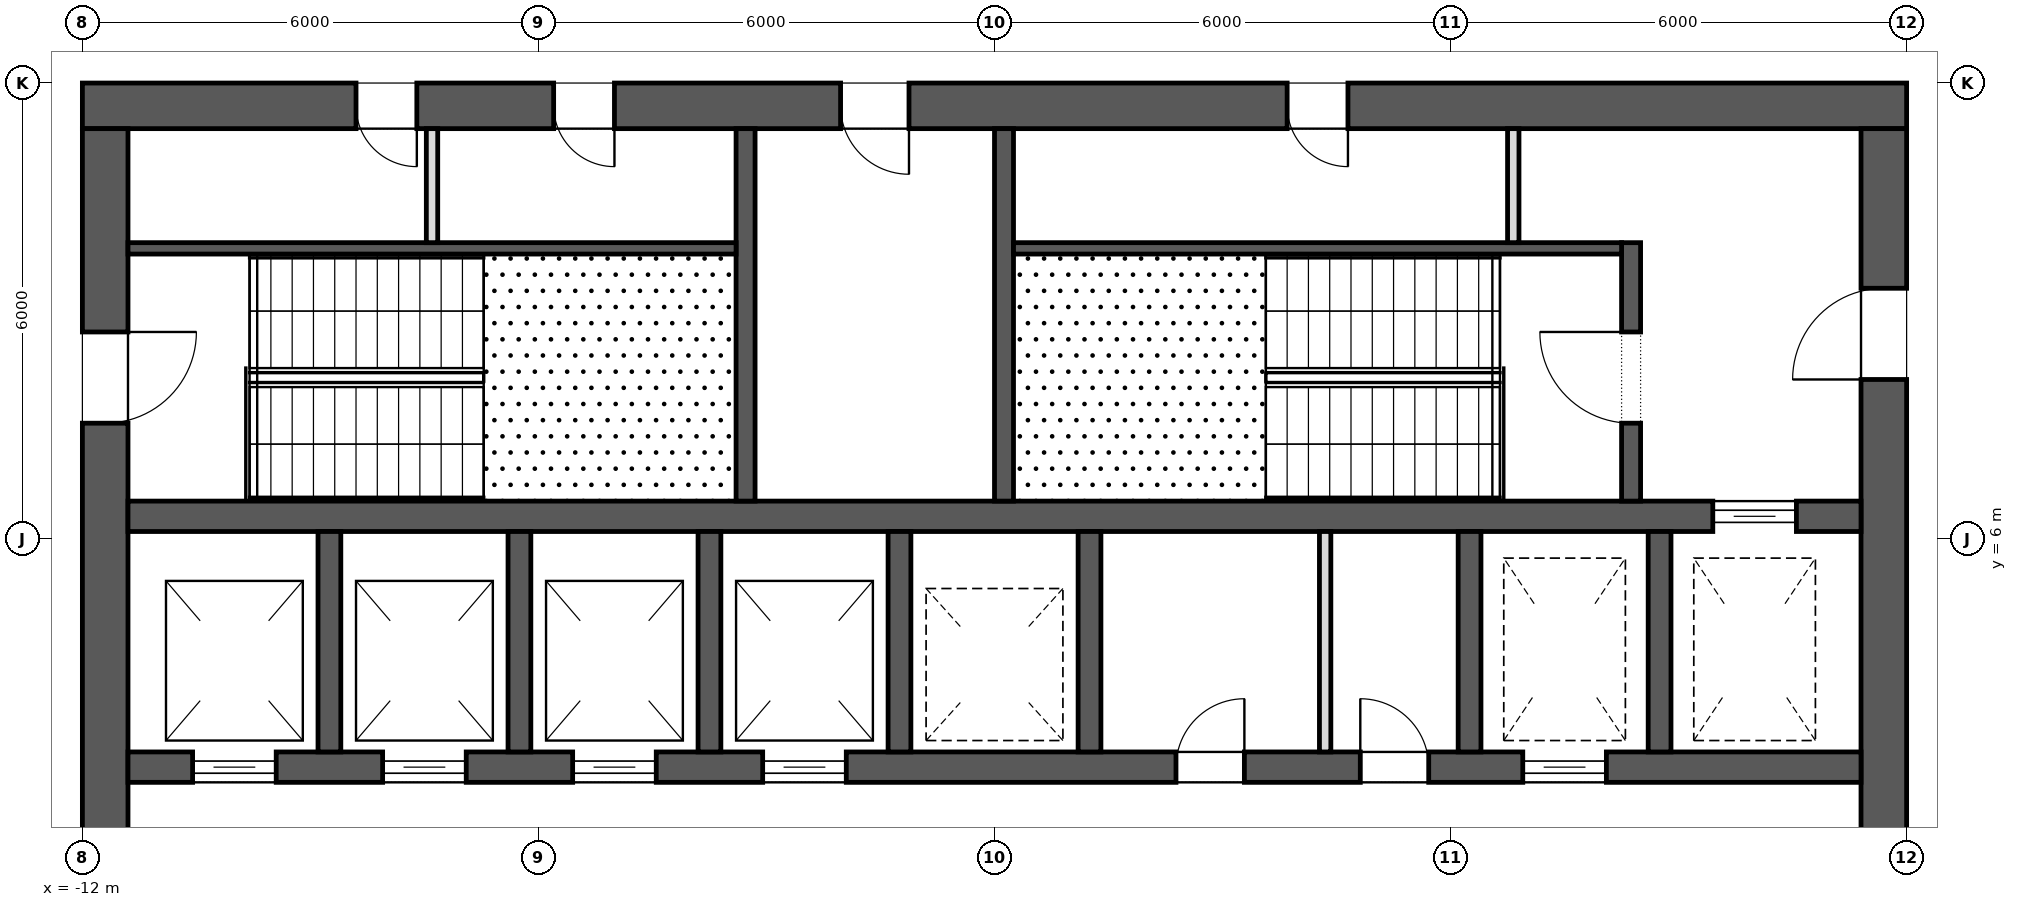
"""IFC4 building model, lengths in metres.
Left out: names, types, materials, properties, quantities, classifications, styles, units other than length and angle.
Written with IfcOpenShell. Run it as: python <this file> out.ifc"""

import sys

from ifc_helpers import new_model, si_unit, direction, frame, frame_2d, origin, place, context, subcontext, project, spatial, rectangle, extrude, element, fill, save


model = new_model("IFC4")
c1 = context("Model", 3, precision=1e-05, world=origin(), true_north=direction((0.0, 1.0)))
c2 = subcontext(c1, "Body", "Model", "MODEL_VIEW")
j1 = project(units=[si_unit("LENGTHUNIT", "METRE"), si_unit("PLANEANGLEUNIT", "RADIAN")], contexts=[c1])
p1 = place(None, origin())
s1 = spatial("IfcSite", under=j1, at=p1, CompositionType="ELEMENT")
p2 = place(p1, origin())
s2 = spatial("IfcBuilding", under=s1, at=p2, CompositionType="ELEMENT")
p3 = place(p2, frame((0.0, 0.0, 222.9)))
s3 = spatial("IfcBuildingStorey", under=s2, at=p3, CompositionType="ELEMENT", Elevation=222.9)
p4 = place(p3, frame((-12.0, 11.7, 0.0), z_axis=(0.0, 0.0, 1.0), x_axis=(1.0, 0.0, 0.0)))
e1 = element("IfcWall", 1, at=p4, inside=s3, PredefinedType="SHEAR", context=c2, shape_type="SweptSolid", body=[
    extrude(rectangle(XDim=24.0, YDim=0.6, at=frame_2d((12.0, 0.0))), origin(), (0.0, 0.0, 1.0), 4.0),
])
p5 = place(p4, frame((9.975, 0.0, 0.0)))
e2 = element("IfcOpeningElement", 2, at=p5, cuts=e1, PredefinedType="OPENING", context=c2, shape_type="SweptSolid", body=[
    extrude(rectangle(XDim=0.9, YDim=2.1, at=frame_2d((0.45, 1.05))), frame((0.0, 0.312, 0.0), z_axis=(0.0, -1.0, 0.0), x_axis=(1.0, 0.0, 0.0)), (0.0, 0.0, 1.0), 0.624),
])
p6 = place(p4, frame((3.6, 0.0, 0.0)))
e3 = element("IfcOpeningElement", 3, at=p6, cuts=e1, PredefinedType="OPENING", context=c2, shape_type="SweptSolid", body=[
    extrude(rectangle(XDim=0.8, YDim=2.1, at=frame_2d((0.4, 1.05))), frame((0.0, 0.312, 0.0), z_axis=(0.0, -1.0, 0.0), x_axis=(1.0, 0.0, 0.0)), (0.0, 0.0, 1.0), 0.624),
])
p7 = place(p4, frame((6.2, 0.0, 0.0)))
e4 = element("IfcOpeningElement", 4, at=p7, cuts=e1, PredefinedType="OPENING", context=c2, shape_type="SweptSolid", body=[
    extrude(rectangle(XDim=0.8, YDim=2.1, at=frame_2d((0.4, 1.05))), frame((0.0, 0.312, 0.0), z_axis=(0.0, -1.0, 0.0), x_axis=(1.0, 0.0, 0.0)), (0.0, 0.0, 1.0), 0.624),
])
p8 = place(p4, frame((15.85, 0.0, 0.0)))
e5 = element("IfcOpeningElement", 5, at=p8, cuts=e1, PredefinedType="OPENING", context=c2, shape_type="SweptSolid", body=[
    extrude(rectangle(XDim=0.8, YDim=2.1, at=frame_2d((0.4, 1.05))), frame((0.0, 0.312, 0.0), z_axis=(0.0, -1.0, 0.0), x_axis=(1.0, 0.0, 0.0)), (0.0, 0.0, 1.0), 0.624),
])
p9 = place(p3, frame((11.7, -11.4, 0.0), z_axis=(0.0, 0.0, 1.0), x_axis=(0.0, 1.0, 0.0)))
e6 = element("IfcWall", 6, at=p9, inside=s3, PredefinedType="SHEAR", context=c2, shape_type="SweptSolid", body=[
    extrude(rectangle(XDim=22.8, YDim=0.6, at=frame_2d((11.4, 0.0))), origin(), (0.0, 0.0, 1.0), 4.0),
])
p10 = place(p9, frame((10.2, 0.0, 0.0)))
e7 = element("IfcOpeningElement", 7, at=p10, cuts=e6, PredefinedType="OPENING", context=c2, shape_type="SweptSolid", body=[
    extrude(rectangle(XDim=2.4, YDim=2.1, at=frame_2d((1.2, 1.05))), frame((0.0, 0.312, 0.0), z_axis=(0.0, -1.0, 0.0), x_axis=(1.0, 0.0, 0.0)), (0.0, 0.0, 1.0), 0.624),
])
p11 = place(p9, frame((19.5, 0.0, 0.0)))
e8 = element("IfcOpeningElement", 8, at=p11, cuts=e6, PredefinedType="OPENING", context=c2, shape_type="SweptSolid", body=[
    extrude(rectangle(XDim=1.2, YDim=2.1, at=frame_2d((0.6, 1.05))), frame((0.0, 0.312, 0.0), z_axis=(0.0, -1.0, 0.0), x_axis=(1.0, 0.0, 0.0)), (0.0, 0.0, 1.0), 0.624),
])
p12 = place(p9, frame((2.1, 0.0, 0.0)))
e9 = element("IfcOpeningElement", 9, at=p12, cuts=e6, PredefinedType="OPENING", context=c2, shape_type="SweptSolid", body=[
    extrude(rectangle(XDim=1.2, YDim=2.1, at=frame_2d((0.6, 1.05))), frame((0.0, 0.312, 0.0), z_axis=(0.0, -1.0, 0.0), x_axis=(1.0, 0.0, 0.0)), (0.0, 0.0, 1.0), 0.624),
])
p13 = place(p3, frame((-11.7, -11.4, 0.0), z_axis=(0.0, 0.0, 1.0), x_axis=(0.0, 1.0, 0.0)))
e10 = element("IfcWall", 10, at=p13, inside=s3, PredefinedType="SHEAR", context=c2, shape_type="SweptSolid", body=[
    extrude(rectangle(XDim=22.8, YDim=0.6, at=frame_2d((11.4, 0.0))), origin(), (0.0, 0.0, 1.0), 4.0),
])
p14 = place(p13, frame((10.2, 0.0, 0.0)))
e11 = element("IfcOpeningElement", 11, at=p14, cuts=e10, PredefinedType="OPENING", context=c2, shape_type="SweptSolid", body=[
    extrude(rectangle(XDim=2.4, YDim=2.1, at=frame_2d((1.2, 1.05))), frame((0.0, 0.312, 0.0), z_axis=(0.0, -1.0, 0.0), x_axis=(1.0, 0.0, 0.0)), (0.0, 0.0, 1.0), 0.624),
])
p15 = place(p13, frame((18.925, 0.0, 0.0)))
e12 = element("IfcOpeningElement", 12, at=p15, cuts=e10, PredefinedType="OPENING", context=c2, shape_type="SweptSolid", body=[
    extrude(rectangle(XDim=1.2, YDim=2.1, at=frame_2d((0.6, 1.05))), frame((0.0, 0.312, 0.0), z_axis=(0.0, -1.0, 0.0), x_axis=(1.0, 0.0, 0.0)), (0.0, 0.0, 1.0), 0.624),
])
p16 = place(p13, frame((2.675, 0.0, 0.0)))
e13 = element("IfcOpeningElement", 13, at=p16, cuts=e10, PredefinedType="OPENING", context=c2, shape_type="SweptSolid", body=[
    extrude(rectangle(XDim=1.2, YDim=2.1, at=frame_2d((0.6, 1.05))), frame((0.0, 0.312, 0.0), z_axis=(0.0, -1.0, 0.0), x_axis=(1.0, 0.0, 0.0)), (0.0, 0.0, 1.0), 0.624),
])
p17 = place(p3, frame((-11.4, 3.0, 0.0), z_axis=(0.0, 0.0, 1.0), x_axis=(1.0, 0.0, 0.0)))
e14 = element("IfcWall", 14, at=p17, inside=s3, PredefinedType="SHEAR", context=c2, shape_type="SweptSolid", body=[
    extrude(rectangle(XDim=22.8, YDim=0.4, at=frame_2d((11.4, 0.0))), origin(), (0.0, 0.0, 1.0), 4.0),
])
p18 = place(p17, frame((0.85, 0.0, 0.0)))
e15 = element("IfcOpeningElement", 15, at=p18, cuts=e14, PredefinedType="OPENING", context=c2, shape_type="SweptSolid", body=[
    extrude(rectangle(XDim=1.1, YDim=2.1, at=frame_2d((0.55, 1.05))), frame((0.0, 0.212, 0.0), z_axis=(0.0, -1.0, 0.0), x_axis=(1.0, 0.0, 0.0)), (0.0, 0.0, 1.0), 0.424),
])
p19 = place(p17, frame((3.35, 0.0, 0.0)))
e16 = element("IfcOpeningElement", 16, at=p19, cuts=e14, PredefinedType="OPENING", context=c2, shape_type="SweptSolid", body=[
    extrude(rectangle(XDim=1.1, YDim=2.1, at=frame_2d((0.55, 1.05))), frame((0.0, 0.212, 0.0), z_axis=(0.0, -1.0, 0.0), x_axis=(1.0, 0.0, 0.0)), (0.0, 0.0, 1.0), 0.424),
])
p20 = place(p17, frame((5.85, 0.0, 0.0)))
e17 = element("IfcOpeningElement", 17, at=p20, cuts=e14, PredefinedType="OPENING", context=c2, shape_type="SweptSolid", body=[
    extrude(rectangle(XDim=1.1, YDim=2.1, at=frame_2d((0.55, 1.05))), frame((0.0, 0.212, 0.0), z_axis=(0.0, -1.0, 0.0), x_axis=(1.0, 0.0, 0.0)), (0.0, 0.0, 1.0), 0.424),
])
p21 = place(p17, frame((8.35, 0.0, 0.0)))
e18 = element("IfcOpeningElement", 18, at=p21, cuts=e14, PredefinedType="OPENING", context=c2, shape_type="SweptSolid", body=[
    extrude(rectangle(XDim=1.1, YDim=2.1, at=frame_2d((0.55, 1.05))), frame((0.0, 0.212, 0.0), z_axis=(0.0, -1.0, 0.0), x_axis=(1.0, 0.0, 0.0)), (0.0, 0.0, 1.0), 0.424),
])
p22 = place(p17, frame((18.35, 0.0, 0.0)))
e19 = element("IfcOpeningElement", 19, at=p22, cuts=e14, PredefinedType="OPENING", context=c2, shape_type="SweptSolid", body=[
    extrude(rectangle(XDim=1.1, YDim=2.1, at=frame_2d((0.55, 1.05))), frame((0.0, 0.212, 0.0), z_axis=(0.0, -1.0, 0.0), x_axis=(1.0, 0.0, 0.0)), (0.0, 0.0, 1.0), 0.424),
])
p23 = place(p17, frame((13.788, 0.0, 0.0)))
e20 = element("IfcOpeningElement", 20, at=p23, cuts=e14, PredefinedType="OPENING", context=c2, shape_type="SweptSolid", body=[
    extrude(rectangle(XDim=0.9, YDim=2.1, at=frame_2d((0.45, 1.05))), frame((0.0, 0.212, 0.0), z_axis=(0.0, -1.0, 0.0), x_axis=(1.0, 0.0, 0.0)), (0.0, 0.0, 1.0), 0.424),
])
p24 = place(p17, frame((16.212, 0.0, 0.0)))
e21 = element("IfcOpeningElement", 21, at=p24, cuts=e14, PredefinedType="OPENING", context=c2, shape_type="SweptSolid", body=[
    extrude(rectangle(XDim=0.9, YDim=2.1, at=frame_2d((0.45, 1.05))), frame((0.0, 0.212, 0.0), z_axis=(0.0, -1.0, 0.0), x_axis=(1.0, 0.0, 0.0)), (0.0, 0.0, 1.0), 0.424),
])
p25 = place(p3, frame((-11.4, 6.3, 0.0), z_axis=(0.0, 0.0, 1.0), x_axis=(1.0, 0.0, 0.0)))
e22 = element("IfcWall", 22, at=p25, inside=s3, PredefinedType="SHEAR", context=c2, shape_type="SweptSolid", body=[
    extrude(rectangle(XDim=22.8, YDim=0.4, at=frame_2d((11.4, 0.0))), origin(), (0.0, 0.0, 1.0), 4.0),
])
p26 = place(p25, frame((20.85, 0.0, 0.0)))
e23 = element("IfcOpeningElement", 23, at=p26, cuts=e22, PredefinedType="OPENING", context=c2, shape_type="SweptSolid", body=[
    extrude(rectangle(XDim=1.1, YDim=2.1, at=frame_2d((0.55, 1.05))), frame((0.0, 0.212, 0.0), z_axis=(0.0, -1.0, 0.0), x_axis=(1.0, 0.0, 0.0)), (0.0, 0.0, 1.0), 0.424),
])
for number, where, z_axis, x_axis in (
    (24, (-8.75, 3.2, 0.0), (0.0, 0.0, 1.0), (0.0, 1.0, 0.0)),
    (25, (-6.25, 3.2, 0.0), (0.0, 0.0, 1.0), (0.0, 1.0, 0.0)),
    (26, (-3.75, 3.2, 0.0), (0.0, 0.0, 1.0), (0.0, 1.0, 0.0)),
    (27, (-1.25, 3.2, 0.0), (0.0, 0.0, 1.0), (0.0, 1.0, 0.0)),
    (28, (1.25, 3.2, 0.0), (0.0, 0.0, 1.0), (0.0, 1.0, 0.0)),
    (29, (6.25, 3.2, 0.0), (0.0, 0.0, 1.0), (0.0, 1.0, 0.0)),
    (30, (8.75, 3.2, 0.0), (0.0, 0.0, 1.0), (0.0, 1.0, 0.0)),
):
    element("IfcWall", number, at=place(p3, frame(where, z_axis=z_axis, x_axis=x_axis)), inside=s3, PredefinedType="SHEAR", context=c2, shape_type="SweptSolid", body=[
        extrude(rectangle(XDim=2.9, YDim=0.3, at=frame_2d((1.45, 0.0))), origin(), (0.0, 0.0, 1.0), 4.0),
    ])
for number, where, z_axis, x_axis in (
    (31, (-3.275, 6.5, 0.0), (0.0, 0.0, 1.0), (0.0, 1.0, 0.0)),
    (32, (0.125, 6.5, 0.0), (0.0, 0.0, 1.0), (0.0, 1.0, 0.0)),
):
    element("IfcWall", number, at=place(p3, frame(where, z_axis=z_axis, x_axis=x_axis)), inside=s3, PredefinedType="SHEAR", context=c2, shape_type="SweptSolid", body=[
        extrude(rectangle(XDim=4.9, YDim=0.25, at=frame_2d((2.45, 0.0))), origin(), (0.0, 0.0, 1.0), 3.7),
    ])
p27 = place(p3, frame((8.375, 6.5, 0.0), z_axis=(0.0, 0.0, 1.0), x_axis=(0.0, 1.0, 0.0)))
e33 = element("IfcWall", 33, at=p27, inside=s3, PredefinedType="SHEAR", context=c2, shape_type="SweptSolid", body=[
    extrude(rectangle(XDim=3.4, YDim=0.25, at=frame_2d((1.7, 0.0))), origin(), (0.0, 0.0, 1.0), 3.7),
])
p28 = place(p27, frame((1.025, 0.0, 0.0)))
e34 = element("IfcOpeningElement", 34, at=p28, cuts=e33, PredefinedType="OPENING", context=c2, shape_type="SweptSolid", body=[
    extrude(rectangle(XDim=1.2, YDim=2.1, at=frame_2d((0.6, 1.05))), frame((0.0, 0.137, 0.0), z_axis=(0.0, -1.0, 0.0), x_axis=(1.0, 0.0, 0.0)), (0.0, 0.0, 1.0), 0.274),
])
for number, where, z_axis, x_axis in (
    (35, (-11.4, 9.825, 0.0), (0.0, 0.0, 1.0), (1.0, 0.0, 0.0)),
    (36, (0.25, 9.825, 0.0), (0.0, 0.0, 1.0), (1.0, 0.0, 0.0)),
):
    element("IfcWall", number, at=place(p3, frame(where, z_axis=z_axis, x_axis=x_axis)), inside=s3, PredefinedType="SHEAR", context=c2, shape_type="SweptSolid", body=[
        extrude(rectangle(XDim=8.0, YDim=0.15, at=frame_2d((4.0, 0.0))), origin(), (0.0, 0.0, 1.0), 3.7),
    ])
for number, where, z_axis, x_axis in (
    (37, (-7.4, 9.9, 0.0), (0.0, 0.0, 1.0), (0.0, 1.0, 0.0)),
    (38, (6.825, 9.9, 0.0), (0.0, 0.0, 1.0), (0.0, 1.0, 0.0)),
):
    element("IfcWall", number, at=place(p3, frame(where, z_axis=z_axis, x_axis=x_axis)), inside=s3, PredefinedType="PARTITIONING", context=c2, shape_type="SweptSolid", body=[
        extrude(rectangle(XDim=1.5, YDim=0.15, at=frame_2d((0.75, 0.0))), origin(), (0.0, 0.0, 1.0), 3.7),
    ])
p29 = place(p3, frame((4.35, 3.2, 0.0), z_axis=(0.0, 0.0, 1.0), x_axis=(0.0, 1.0, 0.0)))
e39 = element("IfcWall", 39, at=p29, inside=s3, PredefinedType="PARTITIONING", context=c2, shape_type="SweptSolid", body=[
    extrude(rectangle(XDim=2.9, YDim=0.15, at=frame_2d((1.45, 0.0))), origin(), (0.0, 0.0, 1.0), 3.7),
])
p30 = place(p26, origin())
e40 = element("IfcDoor", 40, at=p30, inside=s3, OperationType="SLIDING_TO_LEFT", PredefinedType="DOOR", context=c2, shape_type="SweptSolid", body=[
    extrude(rectangle(XDim=1.1, YDim=2.1, at=frame_2d((0.55, 1.05))), frame((0.0, 0.025, 0.0), z_axis=(0.0, -1.0, 0.0), x_axis=(1.0, 0.0, 0.0)), (0.0, 0.0, 1.0), 0.05),
])
fill(e23, e40)
p31 = place(p18, origin())
e41 = element("IfcDoor", 41, at=p31, inside=s3, OperationType="SLIDING_TO_LEFT", PredefinedType="DOOR", context=c2, shape_type="SweptSolid", body=[
    extrude(rectangle(XDim=1.1, YDim=2.1, at=frame_2d((0.55, 1.05))), frame((0.0, 0.025, 0.0), z_axis=(0.0, -1.0, 0.0), x_axis=(1.0, 0.0, 0.0)), (0.0, 0.0, 1.0), 0.05),
])
fill(e15, e41)
p32 = place(p19, origin())
e42 = element("IfcDoor", 42, at=p32, inside=s3, OperationType="SLIDING_TO_LEFT", PredefinedType="DOOR", context=c2, shape_type="SweptSolid", body=[
    extrude(rectangle(XDim=1.1, YDim=2.1, at=frame_2d((0.55, 1.05))), frame((0.0, 0.025, 0.0), z_axis=(0.0, -1.0, 0.0), x_axis=(1.0, 0.0, 0.0)), (0.0, 0.0, 1.0), 0.05),
])
fill(e16, e42)
p33 = place(p20, origin())
e43 = element("IfcDoor", 43, at=p33, inside=s3, OperationType="SLIDING_TO_LEFT", PredefinedType="DOOR", context=c2, shape_type="SweptSolid", body=[
    extrude(rectangle(XDim=1.1, YDim=2.1, at=frame_2d((0.55, 1.05))), frame((0.0, 0.025, 0.0), z_axis=(0.0, -1.0, 0.0), x_axis=(1.0, 0.0, 0.0)), (0.0, 0.0, 1.0), 0.05),
])
fill(e17, e43)
p34 = place(p21, origin())
e44 = element("IfcDoor", 44, at=p34, inside=s3, OperationType="SLIDING_TO_LEFT", PredefinedType="DOOR", context=c2, shape_type="SweptSolid", body=[
    extrude(rectangle(XDim=1.1, YDim=2.1, at=frame_2d((0.55, 1.05))), frame((0.0, 0.025, 0.0), z_axis=(0.0, -1.0, 0.0), x_axis=(1.0, 0.0, 0.0)), (0.0, 0.0, 1.0), 0.05),
])
fill(e18, e44)
p35 = place(p22, origin())
e45 = element("IfcDoor", 45, at=p35, inside=s3, OperationType="SLIDING_TO_LEFT", PredefinedType="DOOR", context=c2, shape_type="SweptSolid", body=[
    extrude(rectangle(XDim=1.1, YDim=2.1, at=frame_2d((0.55, 1.05))), frame((0.0, 0.025, 0.0), z_axis=(0.0, -1.0, 0.0), x_axis=(1.0, 0.0, 0.0)), (0.0, 0.0, 1.0), 0.05),
])
fill(e19, e45)
p36 = place(p15, frame((1.2, 0.0, 0.0), z_axis=(0.0, 0.0, 1.0), x_axis=(-1.0, 0.0, 0.0)))
e46 = element("IfcDoor", 46, at=p36, inside=s3, OperationType="SINGLE_SWING_RIGHT", PredefinedType="DOOR", context=c2, shape_type="SweptSolid", body=[
    extrude(rectangle(XDim=1.2, YDim=2.1, at=frame_2d((0.6, 1.05))), frame((0.0, 0.025, 0.0), z_axis=(0.0, -1.0, 0.0), x_axis=(1.0, 0.0, 0.0)), (0.0, 0.0, 1.0), 0.05),
])
fill(e12, e46)
p37 = place(p28, origin())
e47 = element("IfcDoor", 47, at=p37, inside=s3, OperationType="SINGLE_SWING_LEFT", PredefinedType="DOOR", context=c2, shape_type="SweptSolid", body=[
    extrude(rectangle(XDim=1.2, YDim=2.1, at=frame_2d((0.6, 1.05))), frame((0.0, 0.025, 0.0), z_axis=(0.0, -1.0, 0.0), x_axis=(1.0, 0.0, 0.0)), (0.0, 0.0, 1.0), 0.05),
])
fill(e34, e47)
p38 = place(p11, origin())
e48 = element("IfcDoor", 48, at=p38, inside=s3, OperationType="SINGLE_SWING_RIGHT", PredefinedType="DOOR", context=c2, shape_type="SweptSolid", body=[
    extrude(rectangle(XDim=1.2, YDim=2.1, at=frame_2d((0.6, 1.05))), frame((0.0, 0.025, 0.0), z_axis=(0.0, -1.0, 0.0), x_axis=(1.0, 0.0, 0.0)), (0.0, 0.0, 1.0), 0.05),
])
fill(e8, e48)
p39 = place(p5, frame((0.9, 0.0, 0.0), z_axis=(0.0, 0.0, 1.0), x_axis=(-1.0, 0.0, 0.0)))
e49 = element("IfcDoor", 49, at=p39, inside=s3, OperationType="SINGLE_SWING_RIGHT", PredefinedType="DOOR", context=c2, shape_type="SweptSolid", body=[
    extrude(rectangle(XDim=0.9, YDim=2.1, at=frame_2d((0.45, 1.05))), frame((0.0, 0.025, 0.0), z_axis=(0.0, -1.0, 0.0), x_axis=(1.0, 0.0, 0.0)), (0.0, 0.0, 1.0), 0.05),
])
fill(e2, e49)
p40 = place(p6, frame((0.8, 0.0, 0.0), z_axis=(0.0, 0.0, 1.0), x_axis=(-1.0, 0.0, 0.0)))
e50 = element("IfcDoor", 50, at=p40, inside=s3, OperationType="SINGLE_SWING_RIGHT", PredefinedType="DOOR", context=c2, shape_type="SweptSolid", body=[
    extrude(rectangle(XDim=0.8, YDim=2.1, at=frame_2d((0.4, 1.05))), frame((0.0, 0.025, 0.0), z_axis=(0.0, -1.0, 0.0), x_axis=(1.0, 0.0, 0.0)), (0.0, 0.0, 1.0), 0.05),
])
fill(e3, e50)
p41 = place(p7, frame((0.8, 0.0, 0.0), z_axis=(0.0, 0.0, 1.0), x_axis=(-1.0, 0.0, 0.0)))
e51 = element("IfcDoor", 51, at=p41, inside=s3, OperationType="SINGLE_SWING_RIGHT", PredefinedType="DOOR", context=c2, shape_type="SweptSolid", body=[
    extrude(rectangle(XDim=0.8, YDim=2.1, at=frame_2d((0.4, 1.05))), frame((0.0, 0.025, 0.0), z_axis=(0.0, -1.0, 0.0), x_axis=(1.0, 0.0, 0.0)), (0.0, 0.0, 1.0), 0.05),
])
fill(e4, e51)
p42 = place(p8, frame((0.8, 0.0, 0.0), z_axis=(0.0, 0.0, 1.0), x_axis=(-1.0, 0.0, 0.0)))
e52 = element("IfcDoor", 52, at=p42, inside=s3, OperationType="SINGLE_SWING_RIGHT", PredefinedType="DOOR", context=c2, shape_type="SweptSolid", body=[
    extrude(rectangle(XDim=0.8, YDim=2.1, at=frame_2d((0.4, 1.05))), frame((0.0, 0.025, 0.0), z_axis=(0.0, -1.0, 0.0), x_axis=(1.0, 0.0, 0.0)), (0.0, 0.0, 1.0), 0.05),
])
fill(e5, e52)
p43 = place(p23, origin())
e53 = element("IfcDoor", 53, at=p43, inside=s3, OperationType="SINGLE_SWING_LEFT", PredefinedType="DOOR", context=c2, shape_type="SweptSolid", body=[
    extrude(rectangle(XDim=0.9, YDim=2.1, at=frame_2d((0.45, 1.05))), frame((0.0, 0.025, 0.0), z_axis=(0.0, -1.0, 0.0), x_axis=(1.0, 0.0, 0.0)), (0.0, 0.0, 1.0), 0.05),
])
fill(e20, e53)
p44 = place(p24, origin())
e54 = element("IfcDoor", 54, at=p44, inside=s3, OperationType="SINGLE_SWING_RIGHT", PredefinedType="DOOR", context=c2, shape_type="SweptSolid", body=[
    extrude(rectangle(XDim=0.9, YDim=2.1, at=frame_2d((0.45, 1.05))), frame((0.0, 0.025, 0.0), z_axis=(0.0, -1.0, 0.0), x_axis=(1.0, 0.0, 0.0)), (0.0, 0.0, 1.0), 0.05),
])
fill(e21, e54)
save(model, sys.argv[1])
